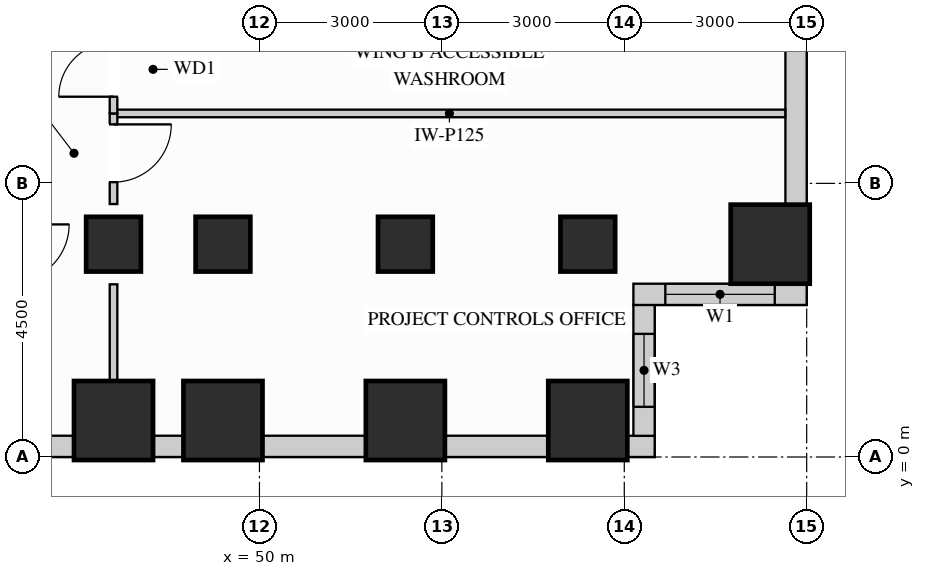
"""IFC4 building model, lengths in metres.
Left out: names, types, materials, properties, quantities, classifications, styles, units other than length and angle.
Written with IfcOpenShell. Run it as: python <this file> out.ifc"""

import sys

from ifc_helpers import new_model, si_unit, direction, frame, frame_2d, origin, origin_2d, place, context, subcontext, project, spatial, rectangle, extrude, source, transform, mapped, element, fill, save


model = new_model("IFC4")
c1 = context("Model", 3, precision=1e-05, world=origin(), true_north=direction((0.0, 1.0)))
c2 = subcontext(c1, "Body", "Model", "MODEL_VIEW")
j1 = project(units=[si_unit("LENGTHUNIT", "METRE"), si_unit("PLANEANGLEUNIT", "RADIAN")], contexts=[c1])
p1 = place(None, origin())
s1 = spatial("IfcSite", under=j1, at=p1, CompositionType="ELEMENT")
p2 = place(p1, origin())
s2 = spatial("IfcBuilding", under=s1, at=p2, CompositionType="ELEMENT")
p3 = place(p2, frame((0.0, 0.0, 26.1)))
s3 = spatial("IfcBuildingStorey", under=s2, at=p3, CompositionType="ELEMENT", Elevation=26.1)
m1 = source(origin(), c2, "Body", "SweptSolid", [
    extrude(rectangle(XDim=0.9, YDim=0.9, at=origin_2d()), origin(), (0.0, 0.0, 1.0), 3.38),
])
for number, where, z_axis, x_axis in (
    (1, (47.6, 3.5, 0.0), (0.0, 0.0, 1.0), (1.0, 0.0, 0.0)),
    (2, (49.4, 3.5, 0.0), (0.0, 0.0, 1.0), (1.0, 0.0, 0.0)),
    (3, (52.4, 3.5, 0.0), (0.0, 0.0, 1.0), (1.0, 0.0, 0.0)),
    (4, (55.4, 3.5, 0.0), (0.0, 0.0, 1.0), (1.0, 0.0, 0.0)),
):
    element("IfcColumn", number, at=place(p3, frame(where, z_axis=z_axis, x_axis=x_axis)), inside=s3, PredefinedType="COLUMN", context=c2, shape_type="MappedRepresentation", body=[
        mapped(m1, transform((0.0, 0.0, 0.0), x_axis=(1.0, 0.0, 0.0), y_axis=(0.0, 1.0, 0.0), z_axis=(0.0, 0.0, 1.0))),
    ])
m2 = source(origin(), c2, "Body", "SweptSolid", [
    extrude(rectangle(XDim=1.3, YDim=1.3, at=origin_2d()), origin(), (0.0, 0.0, 1.0), 3.38),
])
for number, where, z_axis, x_axis in (
    (5, (58.4, 3.5, 0.0), (0.0, 0.0, 1.0), (1.0, 0.0, 0.0)),
    (6, (47.6, 0.6, 0.0), (0.0, 0.0, 1.0), (1.0, 0.0, 0.0)),
    (7, (49.4, 0.6, 0.0), (0.0, 0.0, 1.0), (1.0, 0.0, 0.0)),
    (8, (52.4, 0.6, 0.0), (0.0, 0.0, 1.0), (1.0, 0.0, 0.0)),
    (9, (55.4, 0.6, 0.0), (0.0, 0.0, 1.0), (1.0, 0.0, 0.0)),
):
    element("IfcColumn", number, at=place(p3, frame(where, z_axis=z_axis, x_axis=x_axis)), inside=s3, PredefinedType="COLUMN", context=c2, shape_type="MappedRepresentation", body=[
        mapped(m2, transform((0.0, 0.0, 0.0), x_axis=(1.0, 0.0, 0.0), y_axis=(0.0, 1.0, 0.0), z_axis=(0.0, 0.0, 1.0))),
    ])
p4 = place(p3, frame((40.648, 0.175, 0.0), z_axis=(0.0, 0.0, 1.0), x_axis=(1.0, 0.0, 0.0)))
e10 = element("IfcWall", 10, at=p4, inside=s3, PredefinedType="SOLIDWALL", context=c2, shape_type="SweptSolid", body=[
    extrude(rectangle(XDim=6.304, YDim=0.35, at=frame_2d((3.152, 0.0))), origin(), (0.0, 0.0, 1.0), 2.51),
])
p5 = place(p4, frame((0.687, 0.0, 0.78)))
e11 = element("IfcOpeningElement", 11, at=p5, cuts=e10, PredefinedType="OPENING", context=c2, shape_type="SweptSolid", body=[
    extrude(rectangle(XDim=1.8, YDim=1.55, at=frame_2d((0.9, 0.775))), frame((0.0, 0.185, 0.0), z_axis=(0.0, -1.0, 0.0), x_axis=(1.0, 0.0, 0.0)), (0.0, 0.0, 1.0), 0.37),
])
p6 = place(p4, frame((2.855, 0.0, 0.78)))
e12 = element("IfcOpeningElement", 12, at=p6, cuts=e10, PredefinedType="OPENING", context=c2, shape_type="SweptSolid", body=[
    extrude(rectangle(XDim=1.8, YDim=1.55, at=frame_2d((0.9, 0.775))), frame((0.0, 0.185, 0.0), z_axis=(0.0, -1.0, 0.0), x_axis=(1.0, 0.0, 0.0)), (0.0, 0.0, 1.0), 0.37),
])
m3 = source(origin(), c2, "Body", "SweptSolid", [
    extrude(rectangle(XDim=0.504, YDim=0.35, at=frame_2d((0.252, 0.0))), origin(), (0.0, 0.0, 1.0), 3.365),
])
p7 = place(p3, frame((48.248, 0.175, 0.0), z_axis=(0.0, 0.0, 1.0), x_axis=(1.0, 0.0, 0.0)))
e13 = element("IfcWall", 13, at=p7, inside=s3, PredefinedType="SOLIDWALL", context=c2, shape_type="MappedRepresentation", body=[
    mapped(m3, transform((0.0, 0.0, 0.0), x_axis=(1.0, 0.0, 0.0), y_axis=(0.0, 1.0, 0.0), z_axis=(0.0, 0.0, 1.0))),
])
m4 = source(origin(), c2, "Body", "SweptSolid", [
    extrude(rectangle(XDim=1.704, YDim=0.35, at=frame_2d((0.852, 0.0))), origin(), (0.0, 0.0, 1.0), 2.51),
])
for number, where, z_axis, x_axis in (
    (14, (50.048, 0.175, 0.0), (0.0, 0.0, 1.0), (1.0, 0.0, 0.0)),
    (15, (53.048, 0.175, 0.0), (0.0, 0.0, 1.0), (1.0, 0.0, 0.0)),
):
    element("IfcWall", number, at=place(p3, frame(where, z_axis=z_axis, x_axis=x_axis)), inside=s3, PredefinedType="SOLIDWALL", context=c2, shape_type="MappedRepresentation", body=[
        mapped(m4, transform((0.0, 0.0, 0.0), x_axis=(1.0, 0.0, 0.0), y_axis=(0.0, 1.0, 0.0), z_axis=(0.0, 0.0, 1.0))),
    ])
m5 = source(origin(), c2, "Body", "SweptSolid", [
    extrude(rectangle(XDim=0.452, YDim=0.35, at=frame_2d((0.226, 0.0))), origin(), (0.0, 0.0, 1.0), 3.365),
])
p8 = place(p3, frame((56.048, 0.175, 0.0), z_axis=(0.0, 0.0, 1.0), x_axis=(1.0, 0.0, 0.0)))
e16 = element("IfcWall", 16, at=p8, inside=s3, PredefinedType="SOLIDWALL", context=c2, shape_type="MappedRepresentation", body=[
    mapped(m5, transform((0.0, 0.0, 0.0), x_axis=(1.0, 0.0, 0.0), y_axis=(0.0, 1.0, 0.0), z_axis=(0.0, 0.0, 1.0))),
])
p9 = place(p3, frame((56.325, 0.348, 0.0), z_axis=(0.0, 0.0, 1.0), x_axis=(0.0, 1.0, 0.0)))
e17 = element("IfcWall", 17, at=p9, inside=s3, PredefinedType="SOLIDWALL", context=c2, shape_type="SweptSolid", body=[
    extrude(rectangle(XDim=2.154, YDim=0.35, at=frame_2d((1.077, 0.0))), origin(), (0.0, 0.0, 1.0), 3.365),
])
p10 = place(p9, frame((0.477, 0.0, 0.78)))
e18 = element("IfcOpeningElement", 18, at=p10, cuts=e17, PredefinedType="OPENING", context=c2, shape_type="SweptSolid", body=[
    extrude(rectangle(XDim=1.2, YDim=2.1, at=frame_2d((0.6, 1.05))), frame((0.0, 0.185, 0.0), z_axis=(0.0, -1.0, 0.0), x_axis=(1.0, 0.0, 0.0)), (0.0, 0.0, 1.0), 0.37),
])
p11 = place(p3, frame((56.15, 2.675, 0.0), z_axis=(0.0, 0.0, 1.0), x_axis=(1.0, 0.0, 0.0)))
e19 = element("IfcWall", 19, at=p11, inside=s3, PredefinedType="SOLIDWALL", context=c2, shape_type="SweptSolid", body=[
    extrude(rectangle(XDim=2.85, YDim=0.35, at=frame_2d((1.425, 0.0))), origin(), (0.0, 0.0, 1.0), 3.365),
])
p12 = place(p11, frame((0.525, 0.0, 0.78)))
e20 = element("IfcOpeningElement", 20, at=p12, cuts=e19, PredefinedType="OPENING", context=c2, shape_type="SweptSolid", body=[
    extrude(rectangle(XDim=1.8, YDim=2.1, at=frame_2d((0.9, 1.05))), frame((0.0, 0.185, 0.0), z_axis=(0.0, -1.0, 0.0), x_axis=(1.0, 0.0, 0.0)), (0.0, 0.0, 1.0), 0.37),
])
m6 = source(origin(), c2, "Body", "SweptSolid", [
    extrude(rectangle(XDim=3.204, YDim=0.35, at=frame_2d((1.602, 0.0))), origin(), (0.0, 0.0, 1.0), 2.51),
])
p13 = place(p3, frame((58.825, 4.148, 0.0), z_axis=(0.0, 0.0, 1.0), x_axis=(0.0, 1.0, 0.0)))
e21 = element("IfcWall", 21, at=p13, inside=s3, PredefinedType="SOLIDWALL", context=c2, shape_type="MappedRepresentation", body=[
    mapped(m6, transform((0.0, 0.0, 0.0), x_axis=(1.0, 0.0, 0.0), y_axis=(0.0, 1.0, 0.0), z_axis=(0.0, 0.0, 1.0))),
])
m7 = source(origin(), c2, "Body", "SweptSolid", [
    extrude(rectangle(XDim=11.048, YDim=0.125, at=frame_2d((5.524, 0.0))), origin(), (0.0, 0.0, 1.0), 3.365),
])
p14 = place(p3, frame((47.6, 5.65, 0.0), z_axis=(0.0, 0.0, 1.0), x_axis=(1.0, 0.0, 0.0)))
e22 = element("IfcWall", 22, at=p14, inside=s3, PredefinedType="PARTITIONING", context=c2, shape_type="MappedRepresentation", body=[
    mapped(m7, transform((0.0, 0.0, 0.0), x_axis=(1.0, 0.0, 0.0), y_axis=(0.0, 1.0, 0.0), z_axis=(0.0, 0.0, 1.0))),
])
p15 = place(p3, frame((47.6, 4.16, 0.0), z_axis=(0.0, 0.0, 1.0), x_axis=(0.0, 1.0, 0.0)))
e23 = element("IfcWall", 23, at=p15, inside=s3, PredefinedType="PARTITIONING", context=c2, shape_type="SweptSolid", body=[
    extrude(rectangle(XDim=1.49, YDim=0.125, at=frame_2d((0.745, 0.0))), origin(), (0.0, 0.0, 1.0), 2.67),
])
p16 = place(p15, frame((0.36, 0.0, 0.0)))
e24 = element("IfcOpeningElement", 24, at=p16, cuts=e23, PredefinedType="OPENING", context=c2, shape_type="SweptSolid", body=[
    extrude(rectangle(XDim=0.95, YDim=2.15, at=frame_2d((0.475, 1.075))), frame((0.0, 0.073, 0.0), z_axis=(0.0, -1.0, 0.0), x_axis=(1.0, 0.0, 0.0)), (0.0, 0.0, 1.0), 0.145),
])
m8 = source(origin(), c2, "Body", "SweptSolid", [
    extrude(rectangle(XDim=1.58, YDim=0.125, at=frame_2d((0.79, 0.0))), origin(), (0.0, 0.0, 1.0), 2.67),
])
p17 = place(p3, frame((47.6, 1.26, 0.0), z_axis=(0.0, 0.0, 1.0), x_axis=(0.0, 1.0, 0.0)))
e25 = element("IfcWall", 25, at=p17, inside=s3, PredefinedType="PARTITIONING", context=c2, shape_type="MappedRepresentation", body=[
    mapped(m8, transform((0.0, 0.0, 0.0), x_axis=(1.0, 0.0, 0.0), y_axis=(0.0, 1.0, 0.0), z_axis=(0.0, 0.0, 1.0))),
])
p18 = place(p3, frame((47.6, 5.65, 0.0), z_axis=(0.0, 0.0, 1.0), x_axis=(0.0, 1.0, 0.0)))
e26 = element("IfcWall", 26, at=p18, inside=s3, PredefinedType="PARTITIONING", context=c2, shape_type="SweptSolid", body=[
    extrude(rectangle(XDim=1.5, YDim=0.125, at=frame_2d((0.75, 0.0))), origin(), (0.0, 0.0, 1.0), 2.67),
])
p19 = place(p18, frame((0.275, 0.0, 0.0)))
e27 = element("IfcOpeningElement", 27, at=p19, cuts=e26, PredefinedType="OPENING", context=c2, shape_type="SweptSolid", body=[
    extrude(rectangle(XDim=0.9, YDim=2.15, at=frame_2d((0.45, 1.075))), frame((0.0, 0.073, 0.0), z_axis=(0.0, -1.0, 0.0), x_axis=(1.0, 0.0, 0.0)), (0.0, 0.0, 1.0), 0.145),
])
m9 = source(origin(), c2, "Body", "SweptSolid", [
    extrude(rectangle(XDim=0.95, YDim=2.15, at=frame_2d((0.475, 1.075))), frame((0.0, 0.025, 0.0), z_axis=(0.0, -1.0, 0.0), x_axis=(1.0, 0.0, 0.0)), (0.0, 0.0, 1.0), 0.05),
])
p20 = place(p16, origin())
e28 = element("IfcDoor", 28, at=p20, inside=s3, OperationType="SINGLE_SWING_RIGHT", PredefinedType="DOOR", context=c2, shape_type="MappedRepresentation", body=[
    mapped(m9, transform((0.0, 0.0, 0.0), x_axis=(1.0, 0.0, 0.0), y_axis=(0.0, 1.0, 0.0), z_axis=(0.0, 0.0, 1.0))),
])
fill(e24, e28)
m10 = source(origin(), c2, "Body", "SweptSolid", [
    extrude(rectangle(XDim=0.9, YDim=2.15, at=frame_2d((0.45, 1.075))), frame((0.0, 0.025, 0.0), z_axis=(0.0, -1.0, 0.0), x_axis=(1.0, 0.0, 0.0)), (0.0, 0.0, 1.0), 0.05),
])
p21 = place(p19, origin())
e29 = element("IfcDoor", 29, at=p21, inside=s3, OperationType="SINGLE_SWING_LEFT", PredefinedType="DOOR", context=c2, shape_type="MappedRepresentation", body=[
    mapped(m10, transform((0.0, 0.0, 0.0), x_axis=(1.0, 0.0, 0.0), y_axis=(0.0, 1.0, 0.0), z_axis=(0.0, 0.0, 1.0))),
])
fill(e27, e29)
m11 = source(origin(), c2, "Body", "SweptSolid", [
    extrude(rectangle(XDim=1.8, YDim=2.1, at=frame_2d((0.9, 1.05))), frame((0.0, 0.03, 0.0), z_axis=(0.0, -1.0, 0.0), x_axis=(1.0, 0.0, 0.0)), (0.0, 0.0, 1.0), 0.06),
])
p22 = place(p12, origin())
e30 = element("IfcWindow", 30, at=p22, inside=s3, PartitioningType="SINGLE_PANEL", PredefinedType="WINDOW", context=c2, shape_type="MappedRepresentation", body=[
    mapped(m11, transform((0.0, 0.0, 0.0), x_axis=(1.0, 0.0, 0.0), y_axis=(0.0, 1.0, 0.0), z_axis=(0.0, 0.0, 1.0))),
])
fill(e20, e30)
m12 = source(origin(), c2, "Body", "SweptSolid", [
    extrude(rectangle(XDim=1.2, YDim=2.1, at=frame_2d((0.6, 1.05))), frame((0.0, 0.03, 0.0), z_axis=(0.0, -1.0, 0.0), x_axis=(1.0, 0.0, 0.0)), (0.0, 0.0, 1.0), 0.06),
])
p23 = place(p10, origin())
e31 = element("IfcWindow", 31, at=p23, inside=s3, PartitioningType="SINGLE_PANEL", PredefinedType="WINDOW", context=c2, shape_type="MappedRepresentation", body=[
    mapped(m12, transform((0.0, 0.0, 0.0), x_axis=(1.0, 0.0, 0.0), y_axis=(0.0, 1.0, 0.0), z_axis=(0.0, 0.0, 1.0))),
])
fill(e18, e31)
save(model, sys.argv[1])
